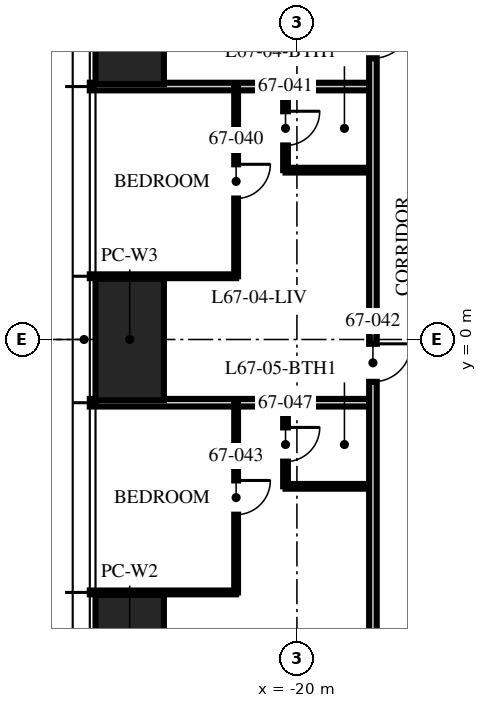
"""IFC4 building model, lengths in metres.
Left out: names, types, materials, properties, quantities, classifications, styles, units other than length and angle.
Written with IfcOpenShell. Run it as: python <this file> out.ifc"""

import sys

from ifc_helpers import new_model, si_unit, direction, frame, frame_2d, origin, origin_2d, place, context, subcontext, project, spatial, rectangle, hollow_rectangle, extrude, element, fill, save


model = new_model("IFC4")
c1 = context("Model", 3, precision=1e-05, world=origin(), true_north=direction((0.0, 1.0)))
c2 = subcontext(c1, "Body", "Model", "MODEL_VIEW")
j1 = project(units=[si_unit("LENGTHUNIT", "METRE"), si_unit("PLANEANGLEUNIT", "RADIAN")], contexts=[c1])
p1 = place(None, origin())
s1 = spatial("IfcSite", under=j1, at=p1, CompositionType="ELEMENT")
p2 = place(p1, origin())
s2 = spatial("IfcBuilding", under=s1, at=p2, CompositionType="ELEMENT")
p3 = place(p2, frame((0.0, 0.0, 267.0)))
s3 = spatial("IfcBuildingStorey", under=s2, at=p3, CompositionType="ELEMENT", Elevation=267.0)
for number, where, z_axis, x_axis in (
    (1, (-24.4, -8.32, 0.0), (0.0, 0.0, 1.0), (0.0, 1.0, 0.0)),
    (2, (-24.4, 0.0, 0.0), (0.0, 0.0, 1.0), (0.0, 1.0, 0.0)),
    (3, (-24.4, 8.32, 0.0), (0.0, 0.0, 1.0), (0.0, 1.0, 0.0)),
):
    element("IfcColumn", number, at=place(p3, frame(where, z_axis=z_axis, x_axis=x_axis)), inside=s3, PredefinedType="COLUMN", context=c2, shape_type="SweptSolid", body=[
        extrude(hollow_rectangle(XDim=3.2, YDim=1.8, WallThickness=0.14, at=origin_2d()), origin(), (0.0, 0.0, 1.0), 3.75),
    ])
p4 = place(p3, frame((-18.1, 6.656, 0.0), z_axis=(0.0, 0.0, 1.0), x_axis=(-1.0, 0.0, 0.0)))
e4 = element("IfcWall", 4, at=p4, inside=s3, PredefinedType="PARTITIONING", context=c2, shape_type="SweptSolid", body=[
    extrude(rectangle(XDim=7.35, YDim=0.2, at=frame_2d((3.675, 0.0))), origin(), (0.0, 0.0, 1.0), 2.91),
])
p5 = place(p3, frame((-21.6, 1.664, 0.0), z_axis=(0.0, 0.0, 1.0), x_axis=(-1.0, 0.0, 0.0)))
e5 = element("IfcWall", 5, at=p5, inside=s3, PredefinedType="PARTITIONING", context=c2, shape_type="SweptSolid", body=[
    extrude(rectangle(XDim=3.85, YDim=0.1, at=frame_2d((1.925, 0.0))), origin(), (0.0, 0.0, 1.0), 2.91),
])
p6 = place(p3, frame((-18.1, -1.664, 0.0), z_axis=(0.0, 0.0, 1.0), x_axis=(-1.0, 0.0, 0.0)))
e6 = element("IfcWall", 6, at=p6, inside=s3, PredefinedType="PARTITIONING", context=c2, shape_type="SweptSolid", body=[
    extrude(rectangle(XDim=7.35, YDim=0.2, at=frame_2d((3.675, 0.0))), origin(), (0.0, 0.0, 1.0), 2.91),
])
p7 = place(p3, frame((-21.6, -6.656, 0.0), z_axis=(0.0, 0.0, 1.0), x_axis=(-1.0, 0.0, 0.0)))
e7 = element("IfcWall", 7, at=p7, inside=s3, PredefinedType="PARTITIONING", context=c2, shape_type="SweptSolid", body=[
    extrude(rectangle(XDim=3.85, YDim=0.1, at=frame_2d((1.925, 0.0))), origin(), (0.0, 0.0, 1.0), 2.91),
])
p8 = place(p3, frame((-21.6, 6.656, 0.0), z_axis=(0.0, 0.0, 1.0), x_axis=(0.0, -1.0, 0.0)))
e8 = element("IfcWall", 8, at=p8, inside=s3, PredefinedType="PARTITIONING", context=c2, shape_type="SweptSolid", body=[
    extrude(rectangle(XDim=4.992, YDim=0.1, at=frame_2d((2.496, 0.0))), origin(), (0.0, 0.0, 1.0), 2.81),
])
p9 = place(p8, frame((2.046, 0.0, 0.0)))
e9 = element("IfcOpeningElement", 9, at=p9, cuts=e8, PredefinedType="OPENING", context=c2, shape_type="SweptSolid", body=[
    extrude(rectangle(XDim=0.9, YDim=2.1, at=frame_2d((0.45, 1.05))), frame((0.0, 0.06, 0.0), z_axis=(0.0, -1.0, 0.0), x_axis=(1.0, 0.0, 0.0)), (0.0, 0.0, 1.0), 0.12),
])
p10 = place(p3, frame((-20.3, 6.656, 0.0), z_axis=(0.0, 0.0, 1.0), x_axis=(0.0, -1.0, 0.0)))
e10 = element("IfcWall", 10, at=p10, inside=s3, PredefinedType="PARTITIONING", context=c2, shape_type="SweptSolid", body=[
    extrude(rectangle(XDim=2.2, YDim=0.125, at=frame_2d((1.1, 0.0))), origin(), (0.0, 0.0, 1.0), 3.5),
])
p11 = place(p10, frame((0.65, 0.0, 0.0)))
e11 = element("IfcOpeningElement", 11, at=p11, cuts=e10, PredefinedType="OPENING", context=c2, shape_type="SweptSolid", body=[
    extrude(rectangle(XDim=0.9, YDim=2.1, at=frame_2d((0.45, 1.05))), frame((0.0, 0.073, 0.0), z_axis=(0.0, -1.0, 0.0), x_axis=(1.0, 0.0, 0.0)), (0.0, 0.0, 1.0), 0.145),
])
p12 = place(p3, frame((-18.1, 4.456, 0.0), z_axis=(0.0, 0.0, 1.0), x_axis=(-1.0, 0.0, 0.0)))
e12 = element("IfcWall", 12, at=p12, inside=s3, PredefinedType="PARTITIONING", context=c2, shape_type="SweptSolid", body=[
    extrude(rectangle(XDim=2.2, YDim=0.125, at=frame_2d((1.1, 0.0))), origin(), (0.0, 0.0, 1.0), 3.5),
])
p13 = place(p3, frame((-21.6, -1.664, 0.0), z_axis=(0.0, 0.0, 1.0), x_axis=(0.0, -1.0, 0.0)))
e13 = element("IfcWall", 13, at=p13, inside=s3, PredefinedType="PARTITIONING", context=c2, shape_type="SweptSolid", body=[
    extrude(rectangle(XDim=4.992, YDim=0.1, at=frame_2d((2.496, 0.0))), origin(), (0.0, 0.0, 1.0), 2.81),
])
p14 = place(p13, frame((2.046, 0.0, 0.0)))
e14 = element("IfcOpeningElement", 14, at=p14, cuts=e13, PredefinedType="OPENING", context=c2, shape_type="SweptSolid", body=[
    extrude(rectangle(XDim=0.9, YDim=2.1, at=frame_2d((0.45, 1.05))), frame((0.0, 0.06, 0.0), z_axis=(0.0, -1.0, 0.0), x_axis=(1.0, 0.0, 0.0)), (0.0, 0.0, 1.0), 0.12),
])
p15 = place(p3, frame((-20.3, -1.664, 0.0), z_axis=(0.0, 0.0, 1.0), x_axis=(0.0, -1.0, 0.0)))
e15 = element("IfcWall", 15, at=p15, inside=s3, PredefinedType="PARTITIONING", context=c2, shape_type="SweptSolid", body=[
    extrude(rectangle(XDim=2.2, YDim=0.125, at=frame_2d((1.1, 0.0))), origin(), (0.0, 0.0, 1.0), 3.5),
])
p16 = place(p15, frame((0.65, 0.0, 0.0)))
e16 = element("IfcOpeningElement", 16, at=p16, cuts=e15, PredefinedType="OPENING", context=c2, shape_type="SweptSolid", body=[
    extrude(rectangle(XDim=0.9, YDim=2.1, at=frame_2d((0.45, 1.05))), frame((0.0, 0.073, 0.0), z_axis=(0.0, -1.0, 0.0), x_axis=(1.0, 0.0, 0.0)), (0.0, 0.0, 1.0), 0.145),
])
p17 = place(p3, frame((-18.1, -3.864, 0.0), z_axis=(0.0, 0.0, 1.0), x_axis=(-1.0, 0.0, 0.0)))
e17 = element("IfcWall", 17, at=p17, inside=s3, PredefinedType="PARTITIONING", context=c2, shape_type="SweptSolid", body=[
    extrude(rectangle(XDim=2.2, YDim=0.125, at=frame_2d((1.1, 0.0))), origin(), (0.0, 0.0, 1.0), 3.5),
])
p18 = place(p3, frame((-18.0, 13.0, 0.0), z_axis=(0.0, 0.0, 1.0), x_axis=(0.0, -1.0, 0.0)))
e18 = element("IfcWall", 18, at=p18, inside=s3, PredefinedType="PARTITIONING", context=c2, shape_type="SweptSolid", body=[
    extrude(rectangle(XDim=26.0, YDim=0.2, at=frame_2d((13.0, 0.0))), origin(), (0.0, 0.0, 1.0), 2.6),
])
p19 = place(p18, frame((4.6, 0.0, 0.0)))
e19 = element("IfcOpeningElement", 19, at=p19, cuts=e18, PredefinedType="OPENING", context=c2, shape_type="SweptSolid", body=[
    extrude(rectangle(XDim=1.0, YDim=2.2, at=frame_2d((0.5, 1.1))), frame((0.0, 0.11, 0.0), z_axis=(0.0, -1.0, 0.0), x_axis=(1.0, 0.0, 0.0)), (0.0, 0.0, 1.0), 0.22),
])
p20 = place(p18, frame((13.114, 0.0, 0.0)))
e20 = element("IfcOpeningElement", 20, at=p20, cuts=e18, PredefinedType="OPENING", context=c2, shape_type="SweptSolid", body=[
    extrude(rectangle(XDim=1.0, YDim=2.2, at=frame_2d((0.5, 1.1))), frame((0.0, 0.11, 0.0), z_axis=(0.0, -1.0, 0.0), x_axis=(1.0, 0.0, 0.0)), (0.0, 0.0, 1.0), 0.22),
])
p21 = place(p18, frame((23.684, 0.0, 0.0)))
e21 = element("IfcOpeningElement", 21, at=p21, cuts=e18, PredefinedType="OPENING", context=c2, shape_type="SweptSolid", body=[
    extrude(rectangle(XDim=1.0, YDim=2.2, at=frame_2d((0.5, 1.1))), frame((0.0, 0.11, 0.0), z_axis=(0.0, -1.0, 0.0), x_axis=(1.0, 0.0, 0.0)), (0.0, 0.0, 1.0), 0.22),
])
p22 = place(p19, origin())
e22 = element("IfcDoor", 22, at=p22, inside=s3, OperationType="SINGLE_SWING_LEFT", PredefinedType="DOOR", context=c2, shape_type="SweptSolid", body=[
    extrude(rectangle(XDim=1.0, YDim=2.2, at=frame_2d((0.5, 1.1))), frame((0.0, 0.025, 0.0), z_axis=(0.0, -1.0, 0.0), x_axis=(1.0, 0.0, 0.0)), (0.0, 0.0, 1.0), 0.05),
])
fill(e19, e22)
p23 = place(p9, origin())
e23 = element("IfcDoor", 23, at=p23, inside=s3, OperationType="SINGLE_SWING_LEFT", PredefinedType="DOOR", context=c2, shape_type="SweptSolid", body=[
    extrude(rectangle(XDim=0.9, YDim=2.1, at=frame_2d((0.45, 1.05))), frame((0.0, 0.025, 0.0), z_axis=(0.0, -1.0, 0.0), x_axis=(1.0, 0.0, 0.0)), (0.0, 0.0, 1.0), 0.05),
])
fill(e9, e23)
p24 = place(p11, origin())
e24 = element("IfcDoor", 24, at=p24, inside=s3, OperationType="SINGLE_SWING_LEFT", PredefinedType="DOOR", context=c2, shape_type="SweptSolid", body=[
    extrude(rectangle(XDim=0.9, YDim=2.1, at=frame_2d((0.45, 1.05))), frame((0.0, 0.025, 0.0), z_axis=(0.0, -1.0, 0.0), x_axis=(1.0, 0.0, 0.0)), (0.0, 0.0, 1.0), 0.05),
])
fill(e11, e24)
p25 = place(p20, origin())
e25 = element("IfcDoor", 25, at=p25, inside=s3, OperationType="SINGLE_SWING_LEFT", PredefinedType="DOOR", context=c2, shape_type="SweptSolid", body=[
    extrude(rectangle(XDim=1.0, YDim=2.2, at=frame_2d((0.5, 1.1))), frame((0.0, 0.025, 0.0), z_axis=(0.0, -1.0, 0.0), x_axis=(1.0, 0.0, 0.0)), (0.0, 0.0, 1.0), 0.05),
])
fill(e20, e25)
p26 = place(p14, origin())
e26 = element("IfcDoor", 26, at=p26, inside=s3, OperationType="SINGLE_SWING_LEFT", PredefinedType="DOOR", context=c2, shape_type="SweptSolid", body=[
    extrude(rectangle(XDim=0.9, YDim=2.1, at=frame_2d((0.45, 1.05))), frame((0.0, 0.025, 0.0), z_axis=(0.0, -1.0, 0.0), x_axis=(1.0, 0.0, 0.0)), (0.0, 0.0, 1.0), 0.05),
])
fill(e14, e26)
p27 = place(p16, origin())
e27 = element("IfcDoor", 27, at=p27, inside=s3, OperationType="SINGLE_SWING_LEFT", PredefinedType="DOOR", context=c2, shape_type="SweptSolid", body=[
    extrude(rectangle(XDim=0.9, YDim=2.1, at=frame_2d((0.45, 1.05))), frame((0.0, 0.025, 0.0), z_axis=(0.0, -1.0, 0.0), x_axis=(1.0, 0.0, 0.0)), (0.0, 0.0, 1.0), 0.05),
])
fill(e16, e27)
save(model, sys.argv[1])
